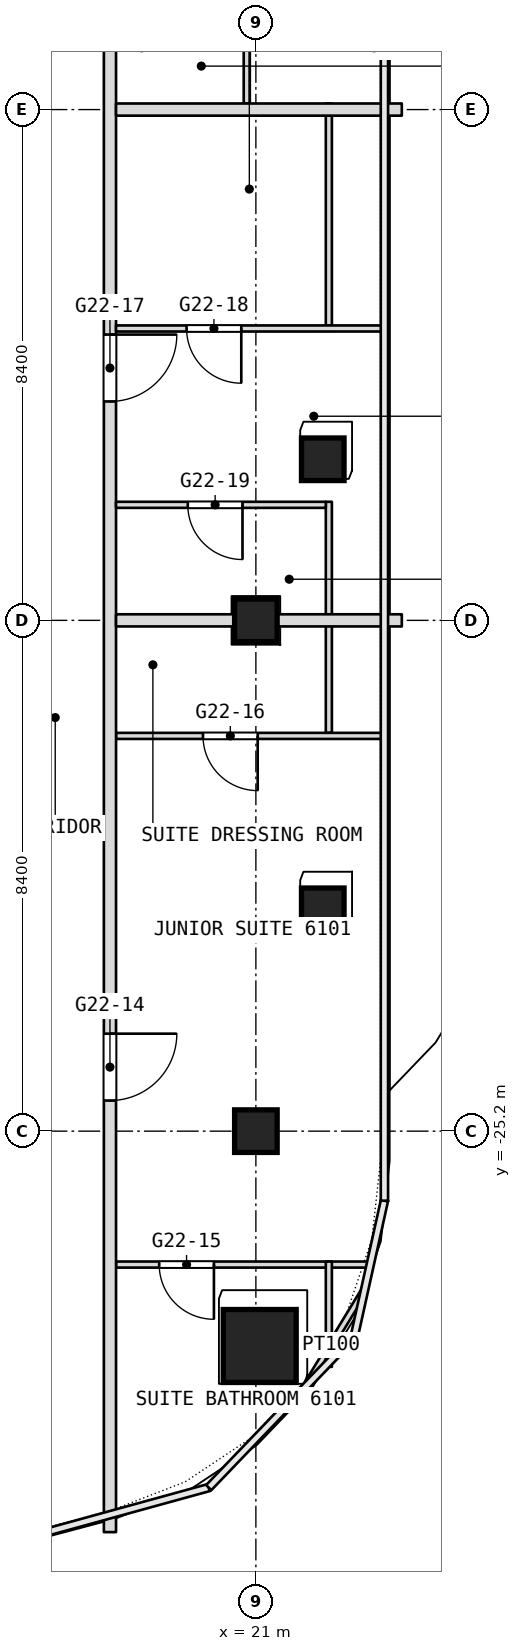
"""IFC4 building model, lengths in metres.
Left out: names, types, materials, properties, quantities, classifications, styles, units other than length and angle.
Written with IfcOpenShell. Run it as: python <this file> out.ifc"""

import sys

from ifc_helpers import new_model, si_unit, direction, frame, frame_2d, origin, origin_2d, place, context, subcontext, project, spatial, rectangle, extrude, element, fill, save


model = new_model("IFC4")
c1 = context("Model", 3, precision=1e-05, world=origin(), true_north=direction((0.0, 1.0)))
c2 = subcontext(c1, "Body", "Model", "MODEL_VIEW")
j1 = project(units=[si_unit("LENGTHUNIT", "METRE"), si_unit("PLANEANGLEUNIT", "RADIAN")], contexts=[c1])
p1 = place(None, origin())
s1 = spatial("IfcSite", under=j1, at=p1, CompositionType="ELEMENT")
p2 = place(p1, origin())
s2 = spatial("IfcBuilding", under=s1, at=p2, CompositionType="ELEMENT")
p3 = place(p2, frame((0.0, 0.0, 266.9)))
s3 = spatial("IfcBuildingStorey", under=s2, at=p3, CompositionType="ELEMENT", Elevation=266.9)
p4 = place(p3, frame((21.063, -28.733, 0.0), z_axis=(0.0, 0.0, 1.0), x_axis=(1.0, 0.0, 0.0)))
e1 = element("IfcColumn", 1, at=p4, inside=s3, PredefinedType="COLUMN", context=c2, shape_type="SweptSolid", body=[
    extrude(rectangle(XDim=1.2, YDim=1.2, at=origin_2d()), origin(), (0.0, 0.0, 1.0), 3.6),
])
p5 = place(p3, frame((21.0, -25.2, -0.26), z_axis=(0.0, 0.0, 1.0), x_axis=(1.0, 0.0, 0.0)))
e2 = element("IfcColumn", 2, at=p5, inside=s3, PredefinedType="COLUMN", context=c2, shape_type="SweptSolid", body=[
    extrude(rectangle(XDim=0.7, YDim=0.7, at=origin_2d()), origin(), (0.0, 0.0, 1.0), 3.86),
])
for number, where, z_axis, x_axis in (
    (3, (21.0, -16.8, 0.0), (0.0, 0.0, 1.0), (1.0, 0.0, 0.0)),
    (4, (22.1, -14.151, 0.0), (0.0, 0.0, 1.0), (1.0, 0.0, 0.0)),
    (5, (22.1, -21.552, 0.0), (0.0, 0.0, 1.0), (1.0, 0.0, 0.0)),
):
    element("IfcColumn", number, at=place(p3, frame(where, z_axis=z_axis, x_axis=x_axis)), inside=s3, PredefinedType="COLUMN", context=c2, shape_type="SweptSolid", body=[
        extrude(rectangle(XDim=0.7, YDim=0.7, at=origin_2d()), origin(), (0.0, 0.0, 1.0), 3.6),
    ])
p6 = place(p3, frame((21.7, -29.599, 0.0), z_axis=(0.0, 0.0, 1.0), x_axis=(0.519440680624, 0.854506512153, 0.0)))
e6 = element("IfcWall", 6, at=p6, inside=s3, PredefinedType="PARTITIONING", context=c2, shape_type="SweptSolid", body=[
    extrude(rectangle(XDim=2.066, YDim=0.1, at=frame_2d((1.033, 0.0))), origin(), (0.0, 0.0, 1.0), 3.34),
])
p7 = place(p3, frame((18.7, -27.394, 0.0), z_axis=(0.0, 0.0, 1.0), x_axis=(1.0, 0.0, 0.0)))
e7 = element("IfcWall", 7, at=p7, inside=s3, PredefinedType="PARTITIONING", context=c2, shape_type="SweptSolid", body=[
    extrude(rectangle(XDim=4.151, YDim=0.1, at=frame_2d((2.076, 0.0))), origin(), (0.0, 0.0, 1.0), 3.34),
])
p8 = place(p7, frame((0.71, 0.0, 0.0)))
e8 = element("IfcOpeningElement", 8, at=p8, cuts=e7, PredefinedType="OPENING", context=c2, shape_type="SweptSolid", body=[
    extrude(rectangle(XDim=0.9, YDim=2.1, at=frame_2d((0.45, 1.05))), frame((0.0, 0.05, 0.0), z_axis=(0.0, -1.0, 0.0), x_axis=(1.0, 0.0, 0.0)), (0.0, 0.0, 1.0), 0.1),
])
p9 = place(p3, frame((22.2, -29.076, 0.0), z_axis=(0.0, 0.0, 1.0), x_axis=(0.0, 1.0, 0.0)))
e9 = element("IfcWall", 9, at=p9, inside=s3, PredefinedType="PARTITIONING", context=c2, shape_type="SweptSolid", body=[
    extrude(rectangle(XDim=1.732, YDim=0.1, at=frame_2d((0.866, 0.0))), origin(), (0.0, 0.0, 1.0), 3.34),
])
p10 = place(p3, frame((22.2, -18.65, 0.0), z_axis=(0.0, 0.0, 1.0), x_axis=(0.0, 1.0, 0.0)))
e10 = element("IfcWall", 10, at=p10, inside=s3, PredefinedType="PARTITIONING", context=c2, shape_type="SweptSolid", body=[
    extrude(rectangle(XDim=3.8, YDim=0.1, at=frame_2d((1.9, 0.0))), origin(), (0.0, 0.0, 1.0), 3.34),
])
p11 = place(p3, frame((22.2, -11.95, 0.0), z_axis=(0.0, 0.0, 1.0), x_axis=(0.0, 1.0, 0.0)))
e11 = element("IfcWall", 11, at=p11, inside=s3, PredefinedType="PARTITIONING", context=c2, shape_type="SweptSolid", body=[
    extrude(rectangle(XDim=3.65, YDim=0.1, at=frame_2d((1.825, 0.0))), origin(), (0.0, 0.0, 1.0), 3.34),
])
p12 = place(p3, frame((20.85, -8.3, 0.0), z_axis=(0.0, 0.0, 1.0), x_axis=(0.0, 1.0, 0.0)))
e12 = element("IfcWall", 12, at=p12, inside=s3, PredefinedType="PARTITIONING", context=c2, shape_type="SweptSolid", body=[
    extrude(rectangle(XDim=2.35, YDim=0.1, at=frame_2d((1.175, 0.0))), origin(), (0.0, 0.0, 1.0), 3.34),
])
p13 = place(p3, frame((18.7, -18.7, 0.0), z_axis=(0.0, 0.0, 1.0), x_axis=(1.0, 0.0, 0.0)))
e13 = element("IfcWall", 13, at=p13, inside=s3, PredefinedType="PARTITIONING", context=c2, shape_type="SweptSolid", body=[
    extrude(rectangle(XDim=4.384, YDim=0.1, at=frame_2d((2.192, 0.0))), origin(), (0.0, 0.0, 1.0), 3.34),
])
p14 = place(p13, frame((1.43, 0.0, 0.0)))
e14 = element("IfcOpeningElement", 14, at=p14, cuts=e13, PredefinedType="OPENING", context=c2, shape_type="SweptSolid", body=[
    extrude(rectangle(XDim=0.9, YDim=2.1, at=frame_2d((0.45, 1.05))), frame((0.0, 0.05, 0.0), z_axis=(0.0, -1.0, 0.0), x_axis=(1.0, 0.0, 0.0)), (0.0, 0.0, 1.0), 0.1),
])
p15 = place(p3, frame((18.6, -31.794, 0.0), z_axis=(0.0, 0.0, 1.0), x_axis=(0.0, 1.0, 0.0)))
e15 = element("IfcWall", 15, at=p15, inside=s3, PredefinedType="PARTITIONING", context=c2, shape_type="SweptSolid", body=[
    extrude(rectangle(XDim=48.697, YDim=0.2, at=frame_2d((24.349, 0.0))), origin(), (0.0, 0.0, 1.0), 3.34),
])
p16 = place(p15, frame((7.097, 0.0, 0.0)))
e16 = element("IfcOpeningElement", 16, at=p16, cuts=e15, PredefinedType="OPENING", context=c2, shape_type="SweptSolid", body=[
    extrude(rectangle(XDim=1.1, YDim=2.1, at=frame_2d((0.55, 1.05))), frame((0.0, 0.1, 0.0), z_axis=(0.0, -1.0, 0.0), x_axis=(1.0, 0.0, 0.0)), (0.0, 0.0, 1.0), 0.2),
])
p17 = place(p15, frame((18.594, 0.0, 0.0)))
e17 = element("IfcOpeningElement", 17, at=p17, cuts=e15, PredefinedType="OPENING", context=c2, shape_type="SweptSolid", body=[
    extrude(rectangle(XDim=1.1, YDim=2.1, at=frame_2d((0.55, 1.05))), frame((0.0, 0.1, 0.0), z_axis=(0.0, -1.0, 0.0), x_axis=(1.0, 0.0, 0.0)), (0.0, 0.0, 1.0), 0.2),
])
p18 = place(p15, frame((26.194, 0.0, 0.0)))
e18 = element("IfcOpeningElement", 18, at=p18, cuts=e15, PredefinedType="OPENING", context=c2, shape_type="SweptSolid", body=[
    extrude(rectangle(XDim=1.0, YDim=2.1, at=frame_2d((0.5, 1.05))), frame((0.0, 0.1, 0.0), z_axis=(0.0, -1.0, 0.0), x_axis=(1.0, 0.0, 0.0)), (0.0, 0.0, 1.0), 0.2),
])
p19 = place(p15, frame((27.994, 0.0, 0.0)))
e19 = element("IfcOpeningElement", 19, at=p19, cuts=e15, PredefinedType="OPENING", context=c2, shape_type="SweptSolid", body=[
    extrude(rectangle(XDim=1.0, YDim=2.1, at=frame_2d((0.5, 1.05))), frame((0.0, 0.1, 0.0), z_axis=(0.0, -1.0, 0.0), x_axis=(1.0, 0.0, 0.0)), (0.0, 0.0, 1.0), 0.2),
])
p20 = place(p15, frame((35.094, 0.0, 0.0)))
e20 = element("IfcOpeningElement", 20, at=p20, cuts=e15, PredefinedType="OPENING", context=c2, shape_type="SweptSolid", body=[
    extrude(rectangle(XDim=1.8, YDim=2.1, at=frame_2d((0.9, 1.05))), frame((0.0, 0.1, 0.0), z_axis=(0.0, -1.0, 0.0), x_axis=(1.0, 0.0, 0.0)), (0.0, 0.0, 1.0), 0.2),
])
p21 = place(p15, frame((43.894, 0.0, 0.0)))
e21 = element("IfcOpeningElement", 21, at=p21, cuts=e15, PredefinedType="OPENING", context=c2, shape_type="SweptSolid", body=[
    extrude(rectangle(XDim=1.1, YDim=2.1, at=frame_2d((0.55, 1.05))), frame((0.0, 0.1, 0.0), z_axis=(0.0, -1.0, 0.0), x_axis=(1.0, 0.0, 0.0)), (0.0, 0.0, 1.0), 0.2),
])
p22 = place(p3, frame((18.7, -16.8, 0.0), z_axis=(0.0, 0.0, 1.0), x_axis=(1.0, 0.0, 0.0)))
e22 = element("IfcWall", 22, at=p22, inside=s3, PredefinedType="PARTITIONING", context=c2, shape_type="SweptSolid", body=[
    extrude(rectangle(XDim=4.7, YDim=0.2, at=frame_2d((2.35, 0.0))), origin(), (0.0, 0.0, 1.0), 3.0),
])
p23 = place(p3, frame((18.7, -14.9, 0.0), z_axis=(0.0, 0.0, 1.0), x_axis=(1.0, 0.0, 0.0)))
e23 = element("IfcWall", 23, at=p23, inside=s3, PredefinedType="PARTITIONING", context=c2, shape_type="SweptSolid", body=[
    extrude(rectangle(XDim=3.45, YDim=0.1, at=frame_2d((1.725, 0.0))), origin(), (0.0, 0.0, 1.0), 3.34),
])
p24 = place(p23, frame((1.18, 0.0, 0.0)))
e24 = element("IfcOpeningElement", 24, at=p24, cuts=e23, PredefinedType="OPENING", context=c2, shape_type="SweptSolid", body=[
    extrude(rectangle(XDim=0.9, YDim=2.1, at=frame_2d((0.45, 1.05))), frame((0.0, 0.05, 0.0), z_axis=(0.0, -1.0, 0.0), x_axis=(1.0, 0.0, 0.0)), (0.0, 0.0, 1.0), 0.1),
])
p25 = place(p3, frame((18.7, -12.0, 0.0), z_axis=(0.0, 0.0, 1.0), x_axis=(1.0, 0.0, 0.0)))
e25 = element("IfcWall", 25, at=p25, inside=s3, PredefinedType="PARTITIONING", context=c2, shape_type="SweptSolid", body=[
    extrude(rectangle(XDim=4.384, YDim=0.1, at=frame_2d((2.192, 0.0))), origin(), (0.0, 0.0, 1.0), 3.34),
])
p26 = place(p25, frame((1.16, 0.0, 0.0)))
e26 = element("IfcOpeningElement", 26, at=p26, cuts=e25, PredefinedType="OPENING", context=c2, shape_type="SweptSolid", body=[
    extrude(rectangle(XDim=0.9, YDim=2.1, at=frame_2d((0.45, 1.05))), frame((0.0, 0.05, 0.0), z_axis=(0.0, -1.0, 0.0), x_axis=(1.0, 0.0, 0.0)), (0.0, 0.0, 1.0), 0.1),
])
p27 = place(p3, frame((18.7, -8.4, 0.0), z_axis=(0.0, 0.0, 1.0), x_axis=(1.0, 0.0, 0.0)))
e27 = element("IfcWall", 27, at=p27, inside=s3, PredefinedType="PARTITIONING", context=c2, shape_type="SweptSolid", body=[
    extrude(rectangle(XDim=4.7, YDim=0.2, at=frame_2d((2.35, 0.0))), origin(), (0.0, 0.0, 1.0), 3.0),
])
p28 = place(p8, origin())
e28 = element("IfcDoor", 28, at=p28, inside=s3, OperationType="SINGLE_SWING_LEFT", PredefinedType="DOOR", context=c2, shape_type="SweptSolid", body=[
    extrude(rectangle(XDim=0.9, YDim=2.1, at=frame_2d((0.45, 1.05))), frame((0.0, 0.025, 0.0), z_axis=(0.0, -1.0, 0.0), x_axis=(1.0, 0.0, 0.0)), (0.0, 0.0, 1.0), 0.05),
])
fill(e8, e28)
p29 = place(p14, origin())
e29 = element("IfcDoor", 29, at=p29, inside=s3, OperationType="SINGLE_SWING_RIGHT", PredefinedType="DOOR", context=c2, shape_type="SweptSolid", body=[
    extrude(rectangle(XDim=0.9, YDim=2.1, at=frame_2d((0.45, 1.05))), frame((0.0, 0.025, 0.0), z_axis=(0.0, -1.0, 0.0), x_axis=(1.0, 0.0, 0.0)), (0.0, 0.0, 1.0), 0.05),
])
fill(e14, e29)
p30 = place(p16, origin())
e30 = element("IfcDoor", 30, at=p30, inside=s3, OperationType="SINGLE_SWING_RIGHT", PredefinedType="DOOR", context=c2, shape_type="SweptSolid", body=[
    extrude(rectangle(XDim=1.1, YDim=2.1, at=frame_2d((0.55, 1.05))), frame((0.0, 0.025, 0.0), z_axis=(0.0, -1.0, 0.0), x_axis=(1.0, 0.0, 0.0)), (0.0, 0.0, 1.0), 0.05),
])
fill(e16, e30)
p31 = place(p17, origin())
e31 = element("IfcDoor", 31, at=p31, inside=s3, OperationType="SINGLE_SWING_LEFT", PredefinedType="DOOR", context=c2, shape_type="SweptSolid", body=[
    extrude(rectangle(XDim=1.1, YDim=2.1, at=frame_2d((0.55, 1.05))), frame((0.0, 0.025, 0.0), z_axis=(0.0, -1.0, 0.0), x_axis=(1.0, 0.0, 0.0)), (0.0, 0.0, 1.0), 0.05),
])
fill(e17, e31)
p32 = place(p24, origin())
e32 = element("IfcDoor", 32, at=p32, inside=s3, OperationType="SINGLE_SWING_LEFT", PredefinedType="DOOR", context=c2, shape_type="SweptSolid", body=[
    extrude(rectangle(XDim=0.9, YDim=2.1, at=frame_2d((0.45, 1.05))), frame((0.0, 0.025, 0.0), z_axis=(0.0, -1.0, 0.0), x_axis=(1.0, 0.0, 0.0)), (0.0, 0.0, 1.0), 0.05),
])
fill(e24, e32)
p33 = place(p26, origin())
e33 = element("IfcDoor", 33, at=p33, inside=s3, OperationType="SINGLE_SWING_LEFT", PredefinedType="DOOR", context=c2, shape_type="SweptSolid", body=[
    extrude(rectangle(XDim=0.9, YDim=2.1, at=frame_2d((0.45, 1.05))), frame((0.0, 0.025, 0.0), z_axis=(0.0, -1.0, 0.0), x_axis=(1.0, 0.0, 0.0)), (0.0, 0.0, 1.0), 0.05),
])
fill(e26, e33)
save(model, sys.argv[1])
